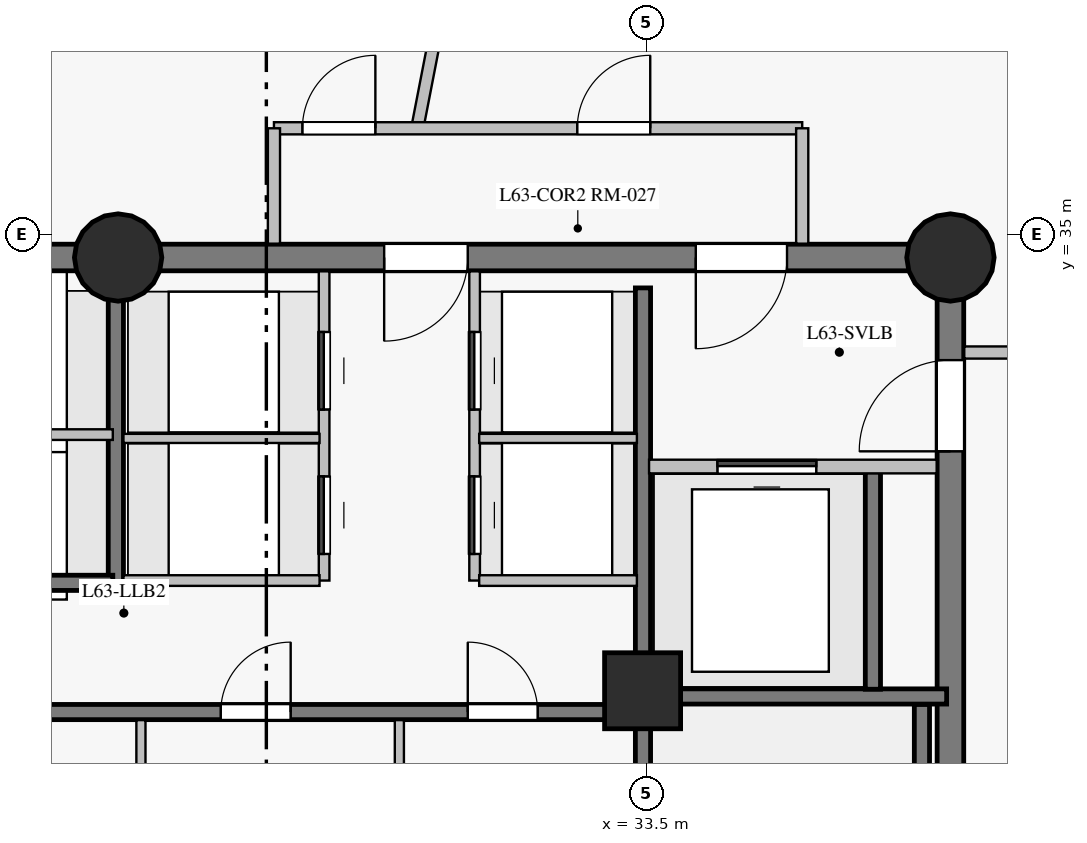
"""IFC4 building model, lengths in metres.
Left out: names, types, materials, properties, quantities, classifications, styles, units other than length and angle.
Written with IfcOpenShell. Run it as: python <this file> out.ifc"""

import sys

from ifc_helpers import new_model, si_unit, direction, frame, frame_2d, origin, origin_with_axes, origin_2d, place, context, subcontext, project, spatial, rectangle, circle, extrude, source, transform, mapped, element, fill, save


model = new_model("IFC4")
c1 = context("Model", 3, precision=1e-05, world=origin(), true_north=direction((0.0, 1.0)))
c2 = subcontext(c1, "Body", "Model", "MODEL_VIEW")
j1 = project(units=[si_unit("LENGTHUNIT", "METRE"), si_unit("PLANEANGLEUNIT", "RADIAN")], contexts=[c1])
p1 = place(None, origin())
s1 = spatial("IfcSite", under=j1, at=p1, CompositionType="ELEMENT")
p2 = place(p1, origin())
s2 = spatial("IfcBuilding", under=s1, at=p2, CompositionType="ELEMENT")
p3 = place(p2, frame((0.0, 0.0, 216.9)))
s3 = spatial("IfcBuildingStorey", under=s2, at=p3, CompositionType="ELEMENT", Elevation=216.9)
p4 = place(p3, frame((37.5, 18.3, 0.0), z_axis=(0.0, 0.0, 1.0), x_axis=(0.0, 1.0, 0.0)))
e1 = element("IfcWall", 1, at=p4, inside=s3, PredefinedType="SHEAR", context=c2, shape_type="SweptSolid", body=[
    extrude(rectangle(XDim=16.4, YDim=0.35, at=frame_2d((8.2, 0.0))), origin(), (0.0, 0.0, 1.0), 2.85),
])
p5 = place(p4, frame((13.85, 0.0, 0.0)))
e2 = element("IfcOpeningElement", 2, at=p5, cuts=e1, PredefinedType="OPENING", context=c2, shape_type="SweptSolid", body=[
    extrude(rectangle(XDim=1.2, YDim=2.15, at=frame_2d((0.6, 1.075))), frame((0.0, 0.185, 0.0), z_axis=(0.0, -1.0, 0.0), x_axis=(1.0, 0.0, 0.0)), (0.0, 0.0, 1.0), 0.37),
])
p6 = place(p3, frame((37.5, 34.7, 0.0), z_axis=(0.0, 0.0, 1.0), x_axis=(-1.0, 0.0, 0.0)))
e3 = element("IfcWall", 3, at=p6, inside=s3, PredefinedType="SHEAR", context=c2, shape_type="SweptSolid", body=[
    extrude(rectangle(XDim=10.95, YDim=0.35, at=frame_2d((5.475, 0.0))), origin(), (0.0, 0.0, 1.0), 2.85),
])
p7 = place(p6, frame((2.15, 0.0, 0.0)))
e4 = element("IfcOpeningElement", 4, at=p7, cuts=e3, PredefinedType="OPENING", context=c2, shape_type="SweptSolid", body=[
    extrude(rectangle(XDim=1.2, YDim=2.15, at=frame_2d((0.6, 1.075))), frame((0.0, 0.185, 0.0), z_axis=(0.0, -1.0, 0.0), x_axis=(1.0, 0.0, 0.0)), (0.0, 0.0, 1.0), 0.37),
])
p8 = place(p6, frame((6.35, 0.0, 0.0)))
e5 = element("IfcOpeningElement", 5, at=p8, cuts=e3, PredefinedType="OPENING", context=c2, shape_type="SweptSolid", body=[
    extrude(rectangle(XDim=1.1, YDim=2.15, at=frame_2d((0.55, 1.075))), frame((0.0, 0.185, 0.0), z_axis=(0.0, -1.0, 0.0), x_axis=(1.0, 0.0, 0.0)), (0.0, 0.0, 1.0), 0.37),
])
p9 = place(p3, frame((26.55, 34.7, 0.0), z_axis=(0.0, 0.0, 1.0), x_axis=(-1.0, 0.0, 0.0)))
e6 = element("IfcWall", 6, at=p9, inside=s3, PredefinedType="SHEAR", context=c2, shape_type="SweptSolid", body=[
    extrude(rectangle(XDim=7.05, YDim=0.35, at=frame_2d((3.525, 0.0))), origin(), (0.0, 0.0, 1.0), 2.85),
])
m1 = source(origin_with_axes(), c2, "Body", "SweptSolid", [
    extrude(circle(Radius=0.575, at=origin_2d()), origin(), (0.0, 0.0, 1.0), 3.05),
])
for number, where, z_axis, x_axis in (
    (7, (26.55, 34.7, 0.0), (0.0, 0.0, 1.0), (1.0, 0.0, 0.0)),
    (8, (37.5, 34.7, 0.0), (0.0, 0.0, 1.0), (1.0, 0.0, 0.0)),
):
    element("IfcColumn", number, at=place(p3, frame(where, z_axis=z_axis, x_axis=x_axis)), inside=s3, PredefinedType="COLUMN", context=c2, shape_type="MappedRepresentation", body=[
        mapped(m1, transform((0.0, 0.0, 0.0), scale=1.0)),
    ])
m2 = source(origin_with_axes(), c2, "Body", "SweptSolid", [
    extrude(rectangle(XDim=1.0, YDim=1.0, at=origin_2d()), origin(), (0.0, 0.0, 1.0), 3.05),
])
p10 = place(p3, frame((33.45, 29.0, 0.0), z_axis=(0.0, 0.0, 1.0), x_axis=(1.0, 0.0, 0.0)))
e9 = element("IfcColumn", 9, at=p10, inside=s3, PredefinedType="COLUMN", context=c2, shape_type="MappedRepresentation", body=[
    mapped(m2, transform((0.0, 0.0, 0.0), scale=1.0)),
])
p11 = place(p3, frame((33.455, 18.7, 0.0), z_axis=(0.0, 0.0, 1.0), x_axis=(0.0, 1.0, 0.0)))
e10 = element("IfcWall", 10, at=p11, inside=s3, PredefinedType="SHEAR", context=c2, shape_type="SweptSolid", body=[
    extrude(rectangle(XDim=15.6, YDim=0.2, at=frame_2d((7.8, 0.0))), origin(), (0.0, 0.0, 1.0), 2.85),
])
p12 = place(p11, frame((2.75, 0.0, 0.0)))
e11 = element("IfcOpeningElement", 11, at=p12, cuts=e10, PredefinedType="OPENING", context=c2, shape_type="SweptSolid", body=[
    extrude(rectangle(XDim=1.15, YDim=2.15, at=frame_2d((0.575, 1.075))), frame((0.0, 0.11, 0.0), z_axis=(0.0, -1.0, 0.0), x_axis=(1.0, 0.0, 0.0)), (0.0, 0.0, 1.0), 0.22),
])
p13 = place(p11, frame((0.55, 0.0, 0.0)))
e12 = element("IfcOpeningElement", 12, at=p13, cuts=e10, PredefinedType="OPENING", context=c2, shape_type="SweptSolid", body=[
    extrude(rectangle(XDim=0.94, YDim=2.1, at=frame_2d((0.47, 1.05))), frame((0.0, 0.11, 0.0), z_axis=(0.0, -1.0, 0.0), x_axis=(1.0, 0.0, 0.0)), (0.0, 0.0, 1.0), 0.22),
])
p14 = place(p3, frame((23.7, 28.72, 0.0), z_axis=(0.0, 0.0, 1.0), x_axis=(1.0, 0.0, 0.0)))
e13 = element("IfcWall", 13, at=p14, inside=s3, PredefinedType="SHEAR", context=c2, shape_type="SweptSolid", body=[
    extrude(rectangle(XDim=9.6, YDim=0.2, at=frame_2d((4.8, 0.0))), origin(), (0.0, 0.0, 1.0), 2.85),
])
p15 = place(p14, frame((0.7, 0.0, 0.0)))
e14 = element("IfcOpeningElement", 14, at=p15, cuts=e13, PredefinedType="OPENING", context=c2, shape_type="SweptSolid", body=[
    extrude(rectangle(XDim=0.92, YDim=2.1, at=frame_2d((0.46, 1.05))), frame((0.0, 0.11, 0.0), z_axis=(0.0, -1.0, 0.0), x_axis=(1.0, 0.0, 0.0)), (0.0, 0.0, 1.0), 0.22),
])
p16 = place(p14, frame((4.2, 0.0, 0.0)))
e15 = element("IfcOpeningElement", 15, at=p16, cuts=e13, PredefinedType="OPENING", context=c2, shape_type="SweptSolid", body=[
    extrude(rectangle(XDim=0.92, YDim=2.1, at=frame_2d((0.46, 1.05))), frame((0.0, 0.11, 0.0), z_axis=(0.0, -1.0, 0.0), x_axis=(1.0, 0.0, 0.0)), (0.0, 0.0, 1.0), 0.22),
])
p17 = place(p14, frame((7.45, 0.0, 0.0)))
e16 = element("IfcOpeningElement", 16, at=p17, cuts=e13, PredefinedType="OPENING", context=c2, shape_type="SweptSolid", body=[
    extrude(rectangle(XDim=0.92, YDim=2.1, at=frame_2d((0.46, 1.05))), frame((0.0, 0.11, 0.0), z_axis=(0.0, -1.0, 0.0), x_axis=(1.0, 0.0, 0.0)), (0.0, 0.0, 1.0), 0.22),
])
p18 = place(p3, frame((37.125, 21.32, 0.0), z_axis=(0.0, 0.0, 1.0), x_axis=(0.0, 1.0, 0.0)))
e17 = element("IfcWall", 17, at=p18, inside=s3, PredefinedType="SHEAR", context=c2, shape_type="SweptSolid", body=[
    extrude(rectangle(XDim=7.5, YDim=0.2, at=frame_2d((3.75, 0.0))), origin(), (0.0, 0.0, 1.0), 2.85),
])
p19 = place(p3, frame((33.455, 28.925, 0.0), z_axis=(0.0, 0.0, 1.0), x_axis=(1.0, 0.0, 0.0)))
e18 = element("IfcWall", 18, at=p19, inside=s3, PredefinedType="SHEAR", context=c2, shape_type="SweptSolid", body=[
    extrude(rectangle(XDim=3.995, YDim=0.2, at=frame_2d((1.998, 0.0))), origin(), (0.0, 0.0, 1.0), 2.85),
])
p20 = place(p3, frame((26.52, 30.42, 0.0), z_axis=(0.0, 0.0, 1.0), x_axis=(0.0, 1.0, 0.0)))
e19 = element("IfcWall", 19, at=p20, inside=s3, PredefinedType="SHEAR", context=c2, shape_type="SweptSolid", body=[
    extrude(rectangle(XDim=3.86, YDim=0.2, at=frame_2d((1.93, 0.0))), origin(), (0.0, 0.0, 1.0), 2.85),
])
p21 = place(p3, frame((36.48, 29.02, 0.0), z_axis=(0.0, 0.0, 1.0), x_axis=(0.0, 1.0, 0.0)))
e20 = element("IfcWall", 20, at=p21, inside=s3, PredefinedType="SHEAR", context=c2, shape_type="SweptSolid", body=[
    extrude(rectangle(XDim=2.86, YDim=0.2, at=frame_2d((1.43, 0.0))), origin(), (0.0, 0.0, 1.0), 2.85),
])
p22 = place(p3, frame((23.7, 30.42, 0.0), z_axis=(0.0, 0.0, 1.0), x_axis=(1.0, 0.0, 0.0)))
e21 = element("IfcWall", 21, at=p22, inside=s3, PredefinedType="SHEAR", context=c2, shape_type="SweptSolid", body=[
    extrude(rectangle(XDim=2.78, YDim=0.2, at=frame_2d((1.39, 0.0))), origin(), (0.0, 0.0, 1.0), 2.85),
])
p23 = place(p3, frame((30.48, 36.371, 0.0), z_axis=(0.0, 0.0, 1.0), x_axis=(0.190817769531, 0.981625477884, 0.0)))
e22 = element("IfcWall", 22, at=p23, inside=s3, PredefinedType="PARTITIONING", context=c2, shape_type="SweptSolid", body=[
    extrude(rectangle(XDim=12.342, YDim=0.16, at=frame_2d((6.171, 0.0))), origin(), (0.0, 0.0, 1.0), 2.85),
])
p24 = place(p3, frame((28.6, 36.4, 0.0), z_axis=(0.0, 0.0, 1.0), x_axis=(1.0, 0.0, 0.0)))
e23 = element("IfcWall", 23, at=p24, inside=s3, PredefinedType="PARTITIONING", context=c2, shape_type="SweptSolid", body=[
    extrude(rectangle(XDim=6.95, YDim=0.16, at=frame_2d((3.475, 0.0))), origin(), (0.0, 0.0, 1.0), 2.45),
])
p25 = place(p24, frame((3.99, 0.0, 0.0)))
e24 = element("IfcOpeningElement", 24, at=p25, cuts=e23, PredefinedType="OPENING", context=c2, shape_type="SweptSolid", body=[
    extrude(rectangle(XDim=0.96, YDim=2.15, at=frame_2d((0.48, 1.075))), frame((0.0, 0.09, 0.0), z_axis=(0.0, -1.0, 0.0), x_axis=(1.0, 0.0, 0.0)), (0.0, 0.0, 1.0), 0.18),
])
p26 = place(p24, frame((0.375, 0.0, 0.0)))
e25 = element("IfcOpeningElement", 25, at=p26, cuts=e23, PredefinedType="OPENING", context=c2, shape_type="SweptSolid", body=[
    extrude(rectangle(XDim=0.96, YDim=2.15, at=frame_2d((0.48, 1.075))), frame((0.0, 0.09, 0.0), z_axis=(0.0, -1.0, 0.0), x_axis=(1.0, 0.0, 0.0)), (0.0, 0.0, 1.0), 0.18),
])
p27 = place(p3, frame((37.682, 33.45, 0.0), z_axis=(0.0, 0.0, 1.0), x_axis=(1.0, 0.0, 0.0)))
e26 = element("IfcWall", 26, at=p27, inside=s3, PredefinedType="PARTITIONING", context=c2, shape_type="SweptSolid", body=[
    extrude(rectangle(XDim=4.118, YDim=0.16, at=frame_2d((2.059, 0.0))), origin(), (0.0, 0.0, 1.0), 2.85),
])
p28 = place(p3, frame((29.26, 30.45, 0.0), z_axis=(0.0, 0.0, 1.0), x_axis=(0.0, 1.0, 0.0)))
e27 = element("IfcWall", 27, at=p28, inside=s3, PredefinedType="PARTITIONING", context=c2, shape_type="SweptSolid", body=[
    extrude(rectangle(XDim=4.068, YDim=0.14, at=frame_2d((2.034, 0.0))), origin(), (0.0, 0.0, 1.0), 2.85),
])
p29 = place(p28, frame((0.35, 0.0, 0.0)))
e28 = element("IfcOpeningElement", 28, at=p29, cuts=e27, PredefinedType="OPENING", context=c2, shape_type="SweptSolid", body=[
    extrude(rectangle(XDim=1.02, YDim=2.15, at=frame_2d((0.51, 1.075))), frame((0.0, 0.08, 0.0), z_axis=(0.0, -1.0, 0.0), x_axis=(1.0, 0.0, 0.0)), (0.0, 0.0, 1.0), 0.16),
])
p30 = place(p28, frame((2.25, 0.0, 0.0)))
e29 = element("IfcOpeningElement", 29, at=p30, cuts=e27, PredefinedType="OPENING", context=c2, shape_type="SweptSolid", body=[
    extrude(rectangle(XDim=1.02, YDim=2.15, at=frame_2d((0.51, 1.075))), frame((0.0, 0.08, 0.0), z_axis=(0.0, -1.0, 0.0), x_axis=(1.0, 0.0, 0.0)), (0.0, 0.0, 1.0), 0.16),
])
p31 = place(p3, frame((31.24, 30.45, 0.0), z_axis=(0.0, 0.0, 1.0), x_axis=(0.0, 1.0, 0.0)))
e30 = element("IfcWall", 30, at=p31, inside=s3, PredefinedType="PARTITIONING", context=c2, shape_type="SweptSolid", body=[
    extrude(rectangle(XDim=4.068, YDim=0.14, at=frame_2d((2.034, 0.0))), origin(), (0.0, 0.0, 1.0), 2.85),
])
p32 = place(p31, frame((0.35, 0.0, 0.0)))
e31 = element("IfcOpeningElement", 31, at=p32, cuts=e30, PredefinedType="OPENING", context=c2, shape_type="SweptSolid", body=[
    extrude(rectangle(XDim=1.02, YDim=2.15, at=frame_2d((0.51, 1.075))), frame((0.0, 0.08, 0.0), z_axis=(0.0, -1.0, 0.0), x_axis=(1.0, 0.0, 0.0)), (0.0, 0.0, 1.0), 0.16),
])
p33 = place(p31, frame((2.25, 0.0, 0.0)))
e32 = element("IfcOpeningElement", 32, at=p33, cuts=e30, PredefinedType="OPENING", context=c2, shape_type="SweptSolid", body=[
    extrude(rectangle(XDim=1.02, YDim=2.15, at=frame_2d((0.51, 1.075))), frame((0.0, 0.08, 0.0), z_axis=(0.0, -1.0, 0.0), x_axis=(1.0, 0.0, 0.0)), (0.0, 0.0, 1.0), 0.16),
])
p34 = place(p3, frame((33.535, 31.95, 0.0), z_axis=(0.0, 0.0, 1.0), x_axis=(1.0, 0.0, 0.0)))
e33 = element("IfcWall", 33, at=p34, inside=s3, PredefinedType="PARTITIONING", context=c2, shape_type="SweptSolid", body=[
    extrude(rectangle(XDim=3.784, YDim=0.18, at=frame_2d((1.892, 0.0))), origin(), (0.0, 0.0, 1.0), 2.85),
])
p35 = place(p34, frame((0.9, 0.0, 0.0)))
e34 = element("IfcOpeningElement", 34, at=p35, cuts=e33, PredefinedType="OPENING", context=c2, shape_type="SweptSolid", body=[
    extrude(rectangle(XDim=1.3, YDim=2.2, at=frame_2d((0.65, 1.1))), frame((0.0, 0.1, 0.0), z_axis=(0.0, -1.0, 0.0), x_axis=(1.0, 0.0, 0.0)), (0.0, 0.0, 1.0), 0.2),
])
p36 = place(p3, frame((23.652, 32.37, 0.0), z_axis=(0.0, 0.0, 1.0), x_axis=(1.0, 0.0, 0.0)))
e35 = element("IfcWall", 35, at=p36, inside=s3, PredefinedType="PARTITIONING", context=c2, shape_type="SweptSolid", body=[
    extrude(rectangle(XDim=2.828, YDim=0.14, at=frame_2d((1.414, 0.0))), origin(), (0.0, 0.0, 1.0), 2.85),
])
p37 = place(p3, frame((26.62, 30.45, 0.0), z_axis=(0.0, 0.0, 1.0), x_axis=(1.0, 0.0, 0.0)))
e36 = element("IfcWall", 36, at=p37, inside=s3, PredefinedType="PARTITIONING", context=c2, shape_type="SweptSolid", body=[
    extrude(rectangle(XDim=2.58, YDim=0.14, at=frame_2d((1.29, 0.0))), origin(), (0.0, 0.0, 1.0), 2.85),
])
p38 = place(p3, frame((26.62, 32.32, 0.0), z_axis=(0.0, 0.0, 1.0), x_axis=(1.0, 0.0, 0.0)))
e37 = element("IfcWall", 37, at=p38, inside=s3, PredefinedType="PARTITIONING", context=c2, shape_type="SweptSolid", body=[
    extrude(rectangle(XDim=2.58, YDim=0.12, at=frame_2d((1.29, 0.0))), origin(), (0.0, 0.0, 1.0), 2.85),
])
for number, where, z_axis, x_axis in (
    (38, (26.85, 26.027, 0.0), (0.0, 0.0, 1.0), (0.0, 1.0, 0.0)),
    (39, (30.25, 26.027, 0.0), (0.0, 0.0, 1.0), (0.0, 1.0, 0.0)),
):
    element("IfcWall", number, at=place(p3, frame(where, z_axis=z_axis, x_axis=x_axis)), inside=s3, PredefinedType="PARTITIONING", context=c2, shape_type="SweptSolid", body=[
        extrude(rectangle(XDim=2.587, YDim=0.12, at=frame_2d((1.293, 0.0))), origin(), (0.0, 0.0, 1.0), 2.85),
    ])
p39 = place(p3, frame((31.3, 30.45, 0.0), z_axis=(0.0, 0.0, 1.0), x_axis=(1.0, 0.0, 0.0)))
e40 = element("IfcWall", 40, at=p39, inside=s3, PredefinedType="PARTITIONING", context=c2, shape_type="SweptSolid", body=[
    extrude(rectangle(XDim=2.075, YDim=0.14, at=frame_2d((1.038, 0.0))), origin(), (0.0, 0.0, 1.0), 2.85),
])
p40 = place(p3, frame((31.3, 32.32, 0.0), z_axis=(0.0, 0.0, 1.0), x_axis=(1.0, 0.0, 0.0)))
e41 = element("IfcWall", 41, at=p40, inside=s3, PredefinedType="PARTITIONING", context=c2, shape_type="SweptSolid", body=[
    extrude(rectangle(XDim=2.075, YDim=0.12, at=frame_2d((1.038, 0.0))), origin(), (0.0, 0.0, 1.0), 2.85),
])
for number, where, z_axis, x_axis in (
    (42, (28.6, 34.882, 0.0), (0.0, 0.0, 1.0), (0.0, 1.0, 0.0)),
    (43, (35.55, 36.4, 0.0), (0.0, 0.0, 1.0), (0.0, -1.0, 0.0)),
):
    element("IfcWall", number, at=place(p3, frame(where, z_axis=z_axis, x_axis=x_axis)), inside=s3, PredefinedType="PARTITIONING", context=c2, shape_type="SweptSolid", body=[
        extrude(rectangle(XDim=1.518, YDim=0.16, at=frame_2d((0.759, 0.0))), origin(), (0.0, 0.0, 1.0), 2.85),
    ])
m3 = source(origin_with_axes(), c2, "Body", "SweptSolid", [
    extrude(rectangle(XDim=1.2, YDim=2.15, at=frame_2d((0.6, 1.075))), frame((0.0, 0.025, 0.0), z_axis=(0.0, -1.0, 0.0), x_axis=(1.0, 0.0, 0.0)), (0.0, 0.0, 1.0), 0.05),
])
p41 = place(p5, origin())
e44 = element("IfcDoor", 44, at=p41, inside=s3, OperationType="SINGLE_SWING_LEFT", PredefinedType="DOOR", context=c2, shape_type="MappedRepresentation", body=[
    mapped(m3, transform((0.0, 0.0, 0.0), scale=1.0)),
])
fill(e2, e44)
p42 = place(p7, origin())
e45 = element("IfcDoor", 45, at=p42, inside=s3, OperationType="SINGLE_SWING_RIGHT", PredefinedType="DOOR", context=c2, shape_type="MappedRepresentation", body=[
    mapped(m3, transform((0.0, 0.0, 0.0), scale=1.0)),
])
fill(e4, e45)
m4 = source(origin_with_axes(), c2, "Body", "SweptSolid", [
    extrude(rectangle(XDim=1.3, YDim=2.2, at=frame_2d((0.65, 1.1))), frame((0.0, 0.025, 0.0), z_axis=(0.0, -1.0, 0.0), x_axis=(1.0, 0.0, 0.0)), (0.0, 0.0, 1.0), 0.05),
])
p43 = place(p35, origin())
e46 = element("IfcDoor", 46, at=p43, inside=s3, OperationType="SLIDING_TO_LEFT", PredefinedType="DOOR", context=c2, shape_type="MappedRepresentation", body=[
    mapped(m4, transform((0.0, 0.0, 0.0), scale=1.0)),
])
fill(e34, e46)
m5 = source(origin_with_axes(), c2, "Body", "SweptSolid", [
    extrude(rectangle(XDim=0.92, YDim=2.1, at=frame_2d((0.46, 1.05))), frame((0.0, 0.025, 0.0), z_axis=(0.0, -1.0, 0.0), x_axis=(1.0, 0.0, 0.0)), (0.0, 0.0, 1.0), 0.05),
])
p44 = place(p16, origin())
e47 = element("IfcDoor", 47, at=p44, inside=s3, OperationType="SINGLE_SWING_RIGHT", PredefinedType="DOOR", context=c2, shape_type="MappedRepresentation", body=[
    mapped(m5, transform((0.0, 0.0, 0.0), scale=1.0)),
])
fill(e15, e47)
p45 = place(p17, origin())
e48 = element("IfcDoor", 48, at=p45, inside=s3, OperationType="SINGLE_SWING_LEFT", PredefinedType="DOOR", context=c2, shape_type="MappedRepresentation", body=[
    mapped(m5, transform((0.0, 0.0, 0.0), scale=1.0)),
])
fill(e16, e48)
m6 = source(origin_with_axes(), c2, "Body", "SweptSolid", [
    extrude(rectangle(XDim=1.1, YDim=2.15, at=frame_2d((0.55, 1.075))), frame((0.0, 0.025, 0.0), z_axis=(0.0, -1.0, 0.0), x_axis=(1.0, 0.0, 0.0)), (0.0, 0.0, 1.0), 0.05),
])
p46 = place(p8, origin())
e49 = element("IfcDoor", 49, at=p46, inside=s3, OperationType="SINGLE_SWING_RIGHT", PredefinedType="DOOR", context=c2, shape_type="MappedRepresentation", body=[
    mapped(m6, transform((0.0, 0.0, 0.0), scale=1.0)),
])
fill(e5, e49)
m7 = source(origin_with_axes(), c2, "Body", "SweptSolid", [
    extrude(rectangle(XDim=1.02, YDim=2.15, at=frame_2d((0.51, 1.075))), frame((0.0, 0.025, 0.0), z_axis=(0.0, -1.0, 0.0), x_axis=(1.0, 0.0, 0.0)), (0.0, 0.0, 1.0), 0.05),
])
p47 = place(p29, origin())
e50 = element("IfcDoor", 50, at=p47, inside=s3, OperationType="SLIDING_TO_LEFT", PredefinedType="DOOR", context=c2, shape_type="MappedRepresentation", body=[
    mapped(m7, transform((0.0, 0.0, 0.0), scale=1.0)),
])
fill(e28, e50)
p48 = place(p30, origin())
e51 = element("IfcDoor", 51, at=p48, inside=s3, OperationType="SLIDING_TO_LEFT", PredefinedType="DOOR", context=c2, shape_type="MappedRepresentation", body=[
    mapped(m7, transform((0.0, 0.0, 0.0), scale=1.0)),
])
fill(e29, e51)
p49 = place(p32, origin())
e52 = element("IfcDoor", 52, at=p49, inside=s3, OperationType="SLIDING_TO_LEFT", PredefinedType="DOOR", context=c2, shape_type="MappedRepresentation", body=[
    mapped(m7, transform((0.0, 0.0, 0.0), scale=1.0)),
])
fill(e31, e52)
p50 = place(p33, origin())
e53 = element("IfcDoor", 53, at=p50, inside=s3, OperationType="SLIDING_TO_LEFT", PredefinedType="DOOR", context=c2, shape_type="MappedRepresentation", body=[
    mapped(m7, transform((0.0, 0.0, 0.0), scale=1.0)),
])
fill(e32, e53)
m8 = source(origin_with_axes(), c2, "Body", "SweptSolid", [
    extrude(rectangle(XDim=0.96, YDim=2.15, at=frame_2d((0.48, 1.075))), frame((0.0, 0.025, 0.0), z_axis=(0.0, -1.0, 0.0), x_axis=(1.0, 0.0, 0.0)), (0.0, 0.0, 1.0), 0.05),
])
p51 = place(p25, origin())
e54 = element("IfcDoor", 54, at=p51, inside=s3, OperationType="SINGLE_SWING_RIGHT", PredefinedType="DOOR", context=c2, shape_type="MappedRepresentation", body=[
    mapped(m8, transform((0.0, 0.0, 0.0), scale=1.0)),
])
fill(e24, e54)
p52 = place(p26, origin())
e55 = element("IfcDoor", 55, at=p52, inside=s3, OperationType="SINGLE_SWING_RIGHT", PredefinedType="DOOR", context=c2, shape_type="MappedRepresentation", body=[
    mapped(m8, transform((0.0, 0.0, 0.0), scale=1.0)),
])
fill(e25, e55)
save(model, sys.argv[1])
